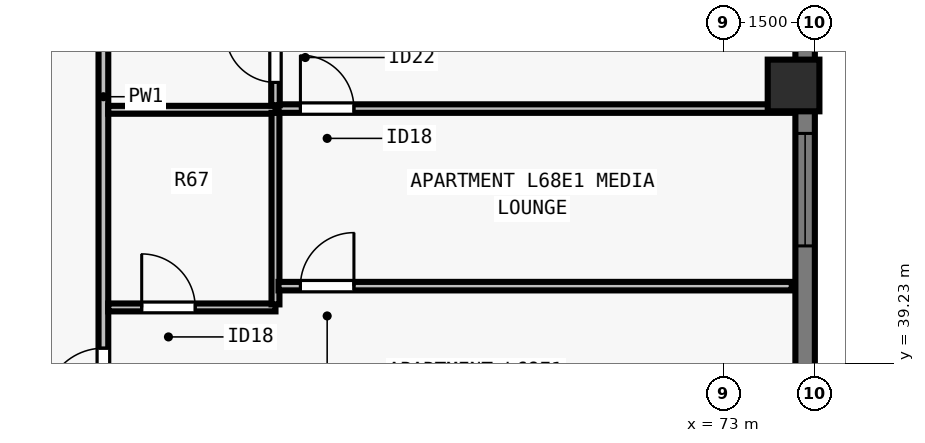
"""IFC4 building model, lengths in metres.
Left out: names, types, materials, properties, quantities, classifications, styles, units other than length and angle.
Written with IfcOpenShell. Run it as: python <this file> out.ifc"""

import sys

from ifc_helpers import new_model, si_unit, direction, frame, frame_2d, origin, origin_2d, place, context, subcontext, project, spatial, rectangle, extrude, element, fill, save


model = new_model("IFC4")
c1 = context("Model", 3, precision=1e-05, world=origin(), true_north=direction((0.0, 1.0)))
c2 = subcontext(c1, "Body", "Model", "MODEL_VIEW")
j1 = project(units=[si_unit("LENGTHUNIT", "METRE"), si_unit("PLANEANGLEUNIT", "RADIAN")], contexts=[c1])
p1 = place(None, origin())
s1 = spatial("IfcSite", under=j1, at=p1, CompositionType="ELEMENT")
p2 = place(p1, origin())
s2 = spatial("IfcBuilding", under=s1, at=p2, CompositionType="ELEMENT")
p3 = place(p2, frame((0.0, 0.0, 248.0)))
s3 = spatial("IfcBuildingStorey", under=s2, at=p3, CompositionType="ELEMENT", Elevation=248.0)
p4 = place(p3, frame((74.15, 43.8, 0.0), z_axis=(0.0, 0.0, 1.0), x_axis=(0.0, 1.0, 0.0)))
e1 = element("IfcColumn", 1, at=p4, inside=s3, PredefinedType="COLUMN", context=c2, shape_type="SweptSolid", body=[
    extrude(rectangle(XDim=0.85, YDim=0.85, at=origin_2d()), origin(), (0.0, 0.0, 1.0), 3.5),
])
p5 = place(p3, frame((74.34, 56.5, 0.0), z_axis=(0.0, 0.0, 1.0), x_axis=(0.0, -1.0, 0.0)))
e2 = element("IfcWall", 2, at=p5, inside=s3, PredefinedType="SOLIDWALL", context=c2, shape_type="SweptSolid", body=[
    extrude(rectangle(XDim=34.702, YDim=0.32, at=frame_2d((17.351, 0.0))), origin(), (0.0, 0.0, 1.0), 3.29),
])
p6 = place(p5, frame((4.763, 0.0, 0.8)))
e3 = element("IfcOpeningElement", 3, at=p6, cuts=e2, PredefinedType="OPENING", context=c2, shape_type="SweptSolid", body=[
    extrude(rectangle(XDim=1.55, YDim=1.678, at=frame_2d((0.775, 0.839))), frame((0.0, 0.17, 0.0), z_axis=(0.0, -1.0, 0.0), x_axis=(1.0, 0.0, 0.0)), (0.0, 0.0, 1.0), 0.34),
])
p7 = place(p5, frame((9.238, 0.0, 0.8)))
e4 = element("IfcOpeningElement", 4, at=p7, cuts=e2, PredefinedType="OPENING", context=c2, shape_type="SweptSolid", body=[
    extrude(rectangle(XDim=1.85, YDim=1.678, at=frame_2d((0.925, 0.839))), frame((0.0, 0.17, 0.0), z_axis=(0.0, -1.0, 0.0), x_axis=(1.0, 0.0, 0.0)), (0.0, 0.0, 1.0), 0.34),
])
p8 = place(p5, frame((13.488, 0.0, 0.8)))
e5 = element("IfcOpeningElement", 5, at=p8, cuts=e2, PredefinedType="OPENING", context=c2, shape_type="SweptSolid", body=[
    extrude(rectangle(XDim=1.85, YDim=1.678, at=frame_2d((0.925, 0.839))), frame((0.0, 0.17, 0.0), z_axis=(0.0, -1.0, 0.0), x_axis=(1.0, 0.0, 0.0)), (0.0, 0.0, 1.0), 0.34),
])
p9 = place(p5, frame((18.264, 0.0, 0.8)))
e6 = element("IfcOpeningElement", 6, at=p9, cuts=e2, PredefinedType="OPENING", context=c2, shape_type="SweptSolid", body=[
    extrude(rectangle(XDim=1.55, YDim=1.678, at=frame_2d((0.775, 0.839))), frame((0.0, 0.17, 0.0), z_axis=(0.0, -1.0, 0.0), x_axis=(1.0, 0.0, 0.0)), (0.0, 0.0, 1.0), 0.34),
])
p10 = place(p5, frame((24.164, 0.0, 0.8)))
e7 = element("IfcOpeningElement", 7, at=p10, cuts=e2, PredefinedType="OPENING", context=c2, shape_type="SweptSolid", body=[
    extrude(rectangle(XDim=1.55, YDim=1.678, at=frame_2d((0.775, 0.839))), frame((0.0, 0.17, 0.0), z_axis=(0.0, -1.0, 0.0), x_axis=(1.0, 0.0, 0.0)), (0.0, 0.0, 1.0), 0.34),
])
p11 = place(p5, frame((30.95, 0.0, 0.8)))
e8 = element("IfcOpeningElement", 8, at=p11, cuts=e2, PredefinedType="OPENING", context=c2, shape_type="SweptSolid", body=[
    extrude(rectangle(XDim=0.9, YDim=1.678, at=frame_2d((0.45, 0.839))), frame((0.0, 0.17, 0.0), z_axis=(0.0, -1.0, 0.0), x_axis=(1.0, 0.0, 0.0)), (0.0, 0.0, 1.0), 0.34),
])
p12 = place(p3, frame((62.8, 30.4, 0.0), z_axis=(0.0, 0.0, 1.0), x_axis=(0.0, 1.0, 0.0)))
e9 = element("IfcWall", 9, at=p12, inside=s3, PredefinedType="PARTITIONING", context=c2, shape_type="SweptSolid", body=[
    extrude(rectangle(XDim=17.2, YDim=0.16, at=frame_2d((8.6, 0.0))), origin(), (0.0, 0.0, 1.0), 3.29),
])
p13 = place(p12, frame((8.12, 0.0, 0.0)))
e10 = element("IfcOpeningElement", 10, at=p13, cuts=e9, PredefinedType="OPENING", context=c2, shape_type="SweptSolid", body=[
    extrude(rectangle(XDim=0.96, YDim=2.18, at=frame_2d((0.48, 1.09))), frame((0.0, 0.09, 0.0), z_axis=(0.0, -1.0, 0.0), x_axis=(1.0, 0.0, 0.0)), (0.0, 0.0, 1.0), 0.18),
])
p14 = place(p3, frame((62.88, 43.4, 0.0), z_axis=(0.0, 0.0, 1.0), x_axis=(1.0, 0.0, 0.0)))
e11 = element("IfcWall", 11, at=p14, inside=s3, PredefinedType="PLUMBINGWALL", context=c2, shape_type="SweptSolid", body=[
    extrude(rectangle(XDim=2.75, YDim=0.13, at=frame_2d((1.375, 0.0))), origin(), (0.0, 0.0, 1.0), 3.29),
])
p15 = place(p3, frame((62.88, 40.15, 0.0), z_axis=(0.0, 0.0, 1.0), x_axis=(1.0, 0.0, 0.0)))
e12 = element("IfcWall", 12, at=p15, inside=s3, PredefinedType="PLUMBINGWALL", context=c2, shape_type="SweptSolid", body=[
    extrude(rectangle(XDim=2.75, YDim=0.13, at=frame_2d((1.375, 0.0))), origin(), (0.0, 0.0, 1.0), 3.29),
])
p16 = place(p15, frame((0.55, 0.0, 0.0)))
e13 = element("IfcOpeningElement", 13, at=p16, cuts=e12, PredefinedType="OPENING", context=c2, shape_type="SweptSolid", body=[
    extrude(rectangle(XDim=0.88, YDim=2.1, at=frame_2d((0.44, 1.05))), frame((0.0, 0.075, 0.0), z_axis=(0.0, -1.0, 0.0), x_axis=(1.0, 0.0, 0.0)), (0.0, 0.0, 1.0), 0.15),
])
p17 = place(p3, frame((65.63, 40.2, 0.0), z_axis=(0.0, 0.0, 1.0), x_axis=(0.0, 1.0, 0.0)))
e14 = element("IfcWall", 14, at=p17, inside=s3, PredefinedType="PLUMBINGWALL", context=c2, shape_type="SweptSolid", body=[
    extrude(rectangle(XDim=3.15, YDim=0.13, at=frame_2d((1.575, 0.0))), origin(), (0.0, 0.0, 1.0), 3.29),
])
p18 = place(p3, frame((65.68, 43.42, 0.0), z_axis=(0.0, 0.0, 1.0), x_axis=(1.0, 0.0, 0.0)))
e15 = element("IfcWall", 15, at=p18, inside=s3, PredefinedType="PARTITIONING", context=c2, shape_type="SweptSolid", body=[
    extrude(rectangle(XDim=8.44, YDim=0.14, at=frame_2d((4.22, 0.0))), origin(), (0.0, 0.0, 1.0), 3.29),
])
p19 = place(p18, frame((0.36, 0.0, 0.0)))
e16 = element("IfcOpeningElement", 16, at=p19, cuts=e15, PredefinedType="OPENING", context=c2, shape_type="SweptSolid", body=[
    extrude(rectangle(XDim=0.88, YDim=2.1, at=frame_2d((0.44, 1.05))), frame((0.0, 0.08, 0.0), z_axis=(0.0, -1.0, 0.0), x_axis=(1.0, 0.0, 0.0)), (0.0, 0.0, 1.0), 0.16),
])
p20 = place(p3, frame((65.63, 43.475, 0.0), z_axis=(0.0, 0.0, 1.0), x_axis=(0.0, 1.0, 0.0)))
e17 = element("IfcWall", 17, at=p20, inside=s3, PredefinedType="PARTITIONING", context=c2, shape_type="SweptSolid", body=[
    extrude(rectangle(XDim=4.06, YDim=0.14, at=frame_2d((2.03, 0.0))), origin(), (0.0, 0.0, 1.0), 3.29),
])
p21 = place(p20, frame((0.375, 0.0, 0.0)))
e18 = element("IfcOpeningElement", 18, at=p21, cuts=e17, PredefinedType="OPENING", context=c2, shape_type="SweptSolid", body=[
    extrude(rectangle(XDim=0.82, YDim=2.1, at=frame_2d((0.41, 1.05))), frame((0.0, 0.08, 0.0), z_axis=(0.0, -1.0, 0.0), x_axis=(1.0, 0.0, 0.0)), (0.0, 0.0, 1.0), 0.16),
])
p22 = place(p3, frame((65.68, 40.5, 0.0), z_axis=(0.0, 0.0, 1.0), x_axis=(1.0, 0.0, 0.0)))
e19 = element("IfcWall", 19, at=p22, inside=s3, PredefinedType="PARTITIONING", context=c2, shape_type="SweptSolid", body=[
    extrude(rectangle(XDim=8.44, YDim=0.14, at=frame_2d((4.22, 0.0))), origin(), (0.0, 0.0, 1.0), 3.29),
])
p23 = place(p22, frame((0.36, 0.0, 0.0)))
e20 = element("IfcOpeningElement", 20, at=p23, cuts=e19, PredefinedType="OPENING", context=c2, shape_type="SweptSolid", body=[
    extrude(rectangle(XDim=0.88, YDim=2.1, at=frame_2d((0.44, 1.05))), frame((0.0, 0.08, 0.0), z_axis=(0.0, -1.0, 0.0), x_axis=(1.0, 0.0, 0.0)), (0.0, 0.0, 1.0), 0.16),
])
p24 = place(p8, origin())
e21 = element("IfcWindow", 21, at=p24, inside=s3, PartitioningType="SINGLE_PANEL", PredefinedType="WINDOW", context=c2, shape_type="SweptSolid", body=[
    extrude(rectangle(XDim=1.85, YDim=1.678, at=frame_2d((0.925, 0.839))), frame((0.0, -0.05, 0.0), z_axis=(0.0, -1.0, 0.0), x_axis=(1.0, 0.0, 0.0)), (0.0, 0.0, 1.0), 0.06),
])
fill(e5, e21)
p25 = place(p16, origin())
e22 = element("IfcDoor", 22, at=p25, inside=s3, OperationType="SINGLE_SWING_LEFT", PredefinedType="DOOR", context=c2, shape_type="SweptSolid", body=[
    extrude(rectangle(XDim=0.88, YDim=2.1, at=frame_2d((0.44, 1.05))), frame((0.0, 0.025, 0.0), z_axis=(0.0, -1.0, 0.0), x_axis=(1.0, 0.0, 0.0)), (0.0, 0.0, 1.0), 0.05),
])
fill(e13, e22)
p26 = place(p21, origin())
e23 = element("IfcDoor", 23, at=p26, inside=s3, OperationType="SINGLE_SWING_RIGHT", PredefinedType="DOOR", context=c2, shape_type="SweptSolid", body=[
    extrude(rectangle(XDim=0.82, YDim=2.1, at=frame_2d((0.41, 1.05))), frame((0.0, 0.025, 0.0), z_axis=(0.0, -1.0, 0.0), x_axis=(1.0, 0.0, 0.0)), (0.0, 0.0, 1.0), 0.05),
])
fill(e18, e23)
p27 = place(p19, origin())
e24 = element("IfcDoor", 24, at=p27, inside=s3, OperationType="SINGLE_SWING_LEFT", PredefinedType="DOOR", context=c2, shape_type="SweptSolid", body=[
    extrude(rectangle(XDim=0.88, YDim=2.1, at=frame_2d((0.44, 1.05))), frame((0.0, 0.025, 0.0), z_axis=(0.0, -1.0, 0.0), x_axis=(1.0, 0.0, 0.0)), (0.0, 0.0, 1.0), 0.05),
])
fill(e16, e24)
p28 = place(p23, origin())
e25 = element("IfcDoor", 25, at=p28, inside=s3, OperationType="SINGLE_SWING_RIGHT", PredefinedType="DOOR", context=c2, shape_type="SweptSolid", body=[
    extrude(rectangle(XDim=0.88, YDim=2.1, at=frame_2d((0.44, 1.05))), frame((0.0, 0.025, 0.0), z_axis=(0.0, -1.0, 0.0), x_axis=(1.0, 0.0, 0.0)), (0.0, 0.0, 1.0), 0.05),
])
fill(e20, e25)
p29 = place(p13, origin())
e26 = element("IfcDoor", 26, at=p29, inside=s3, OperationType="SINGLE_SWING_LEFT", PredefinedType="DOOR", context=c2, shape_type="SweptSolid", body=[
    extrude(rectangle(XDim=0.96, YDim=2.18, at=frame_2d((0.48, 1.09))), frame((0.0, 0.025, 0.0), z_axis=(0.0, -1.0, 0.0), x_axis=(1.0, 0.0, 0.0)), (0.0, 0.0, 1.0), 0.05),
])
fill(e10, e26)
save(model, sys.argv[1])
